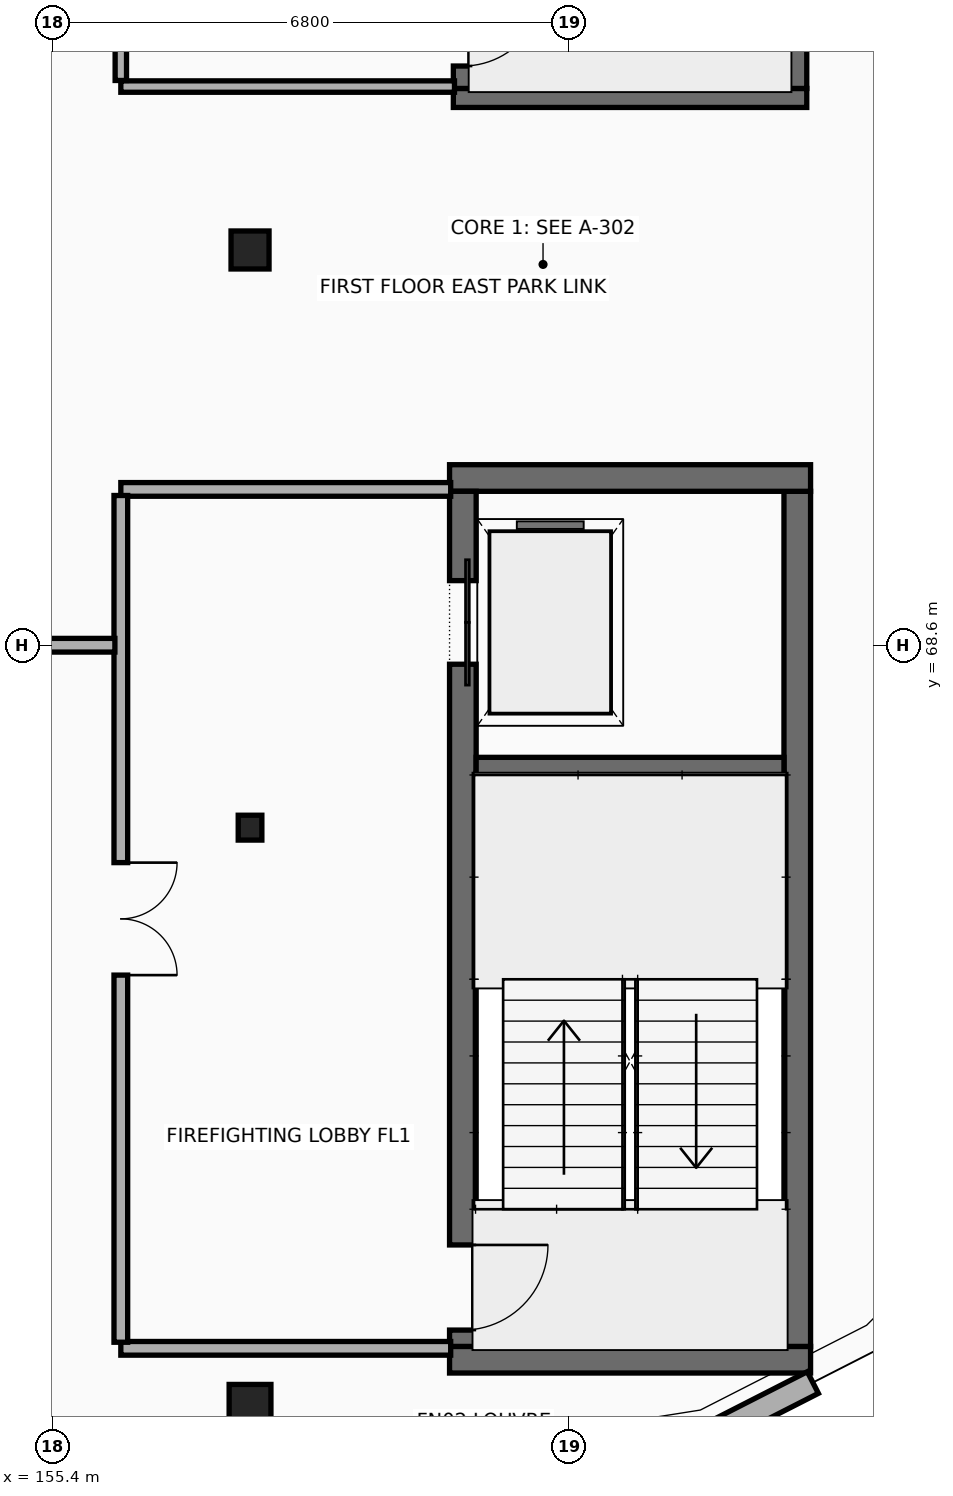
"""IFC4 building model, lengths in metres.
Left out: names, types, materials, properties, quantities, classifications, styles, units other than length and angle.
Written with IfcOpenShell. Run it as: python <this file> out.ifc"""

import sys

from ifc_helpers import new_model, si_unit, direction, frame, frame_2d, origin, origin_2d, place, context, subcontext, project, spatial, rectangle, i_section, extrude, element, fill, save


model = new_model("IFC4")
c1 = context("Model", 3, precision=1e-05, world=origin(), true_north=direction((0.0, 1.0)))
c2 = subcontext(c1, "Body", "Model", "MODEL_VIEW")
j1 = project(units=[si_unit("LENGTHUNIT", "METRE"), si_unit("PLANEANGLEUNIT", "RADIAN")], contexts=[c1])
p1 = place(None, origin())
s1 = spatial("IfcSite", under=j1, at=p1, CompositionType="ELEMENT")
p2 = place(p1, origin())
s2 = spatial("IfcBuilding", under=s1, at=p2, CompositionType="ELEMENT")
p3 = place(p2, frame((0.0, 0.0, 4.8)))
s3 = spatial("IfcBuildingStorey", under=s2, at=p3, CompositionType="ELEMENT", Elevation=4.8)
p4 = place(p3, frame((160.625, 59.2, 0.0), z_axis=(0.0, 0.0, 1.0), x_axis=(1.0, 0.0, 0.0)))
e1 = element("IfcWall", 1, at=p4, inside=s3, PredefinedType="SHEAR", context=c2, shape_type="SweptSolid", body=[
    extrude(rectangle(XDim=4.75, YDim=0.35, at=frame_2d((2.375, 0.0))), origin(), (0.0, 0.0, 1.0), 3.9),
])
p5 = place(p3, frame((165.2, 59.375, 0.0), z_axis=(0.0, 0.0, 1.0), x_axis=(0.0, 1.0, 0.0)))
e2 = element("IfcWall", 2, at=p5, inside=s3, PredefinedType="SHEAR", context=c2, shape_type="SweptSolid", body=[
    extrude(rectangle(XDim=11.25, YDim=0.35, at=frame_2d((5.625, 0.0))), origin(), (0.0, 0.0, 1.0), 3.9),
])
p6 = place(p3, frame((165.375, 70.8, 0.0), z_axis=(0.0, 0.0, 1.0), x_axis=(-1.0, 0.0, 0.0)))
e3 = element("IfcWall", 3, at=p6, inside=s3, PredefinedType="SHEAR", context=c2, shape_type="SweptSolid", body=[
    extrude(rectangle(XDim=4.75, YDim=0.35, at=frame_2d((2.375, 0.0))), origin(), (0.0, 0.0, 1.0), 3.9),
])
p7 = place(p3, frame((160.8, 70.625, 0.0), z_axis=(0.0, 0.0, 1.0), x_axis=(0.0, -1.0, 0.0)))
e4 = element("IfcWall", 4, at=p7, inside=s3, PredefinedType="SHEAR", context=c2, shape_type="SweptSolid", body=[
    extrude(rectangle(XDim=11.25, YDim=0.35, at=frame_2d((5.625, 0.0))), origin(), (0.0, 0.0, 1.0), 3.9),
])
p8 = place(p7, frame((1.175, 0.0, 0.0)))
e5 = element("IfcOpeningElement", 5, at=p8, cuts=e4, PredefinedType="OPENING", context=c2, shape_type="SweptSolid", body=[
    extrude(rectangle(XDim=1.1, YDim=2.2, at=frame_2d((0.55, 1.1))), frame((0.0, 0.185, 0.0), z_axis=(0.0, -1.0, 0.0), x_axis=(1.0, 0.0, 0.0)), (0.0, 0.0, 1.0), 0.37),
])
p9 = place(p7, frame((9.915, 0.0, 0.0)))
e6 = element("IfcOpeningElement", 6, at=p9, cuts=e4, PredefinedType="OPENING", context=c2, shape_type="SweptSolid", body=[
    extrude(rectangle(XDim=1.12, YDim=2.16, at=frame_2d((0.56, 1.08))), frame((0.0, 0.185, 0.0), z_axis=(0.0, -1.0, 0.0), x_axis=(1.0, 0.0, 0.0)), (0.0, 0.0, 1.0), 0.37),
])
p10 = place(p3, frame((160.975, 67.0, 0.0), z_axis=(0.0, 0.0, 1.0), x_axis=(1.0, 0.0, 0.0)))
e7 = element("IfcWall", 7, at=p10, inside=s3, PredefinedType="SHEAR", context=c2, shape_type="SweptSolid", body=[
    extrude(rectangle(XDim=4.05, YDim=0.25, at=frame_2d((2.025, 0.0))), origin(), (0.0, 0.0, 1.0), 3.9),
])
p11 = place(p3, frame((160.675, 75.8, 0.0), z_axis=(0.0, 0.0, 1.0), x_axis=(1.0, 0.0, 0.0)))
e8 = element("IfcWall", 8, at=p11, inside=s3, PredefinedType="SHEAR", context=c2, shape_type="SweptSolid", body=[
    extrude(rectangle(XDim=4.65, YDim=0.25, at=frame_2d((2.325, 0.0))), origin(), (0.0, 0.0, 1.0), 3.9),
])
p12 = place(p3, frame((165.2, 75.925, 0.0), z_axis=(0.0, 0.0, 1.0), x_axis=(0.0, 1.0, 0.0)))
e9 = element("IfcWall", 9, at=p12, inside=s3, PredefinedType="SHEAR", context=c2, shape_type="SweptSolid", body=[
    extrude(rectangle(XDim=11.35, YDim=0.25, at=frame_2d((5.675, 0.0))), origin(), (0.0, 0.0, 1.0), 3.9),
])
p13 = place(p3, frame((160.8, 87.275, 0.0), z_axis=(0.0, 0.0, 1.0), x_axis=(0.0, -1.0, 0.0)))
e10 = element("IfcWall", 10, at=p13, inside=s3, PredefinedType="SHEAR", context=c2, shape_type="SweptSolid", body=[
    extrude(rectangle(XDim=11.35, YDim=0.25, at=frame_2d((5.675, 0.0))), origin(), (0.0, 0.0, 1.0), 3.9),
])
p14 = place(p13, frame((1.275, 0.0, 0.0)))
e11 = element("IfcOpeningElement", 11, at=p14, cuts=e10, PredefinedType="OPENING", context=c2, shape_type="SweptSolid", body=[
    extrude(rectangle(XDim=1.0, YDim=2.15, at=frame_2d((0.5, 1.075))), frame((0.0, 0.135, 0.0), z_axis=(0.0, -1.0, 0.0), x_axis=(1.0, 0.0, 0.0)), (0.0, 0.0, 1.0), 0.27),
])
p15 = place(p13, frame((9.995, 0.0, 0.0)))
e12 = element("IfcOpeningElement", 12, at=p15, cuts=e10, PredefinedType="OPENING", context=c2, shape_type="SweptSolid", body=[
    extrude(rectangle(XDim=1.06, YDim=2.15, at=frame_2d((0.53, 1.075))), frame((0.0, 0.135, 0.0), z_axis=(0.0, -1.0, 0.0), x_axis=(1.0, 0.0, 0.0)), (0.0, 0.0, 1.0), 0.27),
])
p16 = place(p3, frame((158.0, 58.6, 0.0), z_axis=(0.0, 0.0, 1.0), x_axis=(1.0, 0.0, 0.0)))
e13 = element("IfcColumn", 13, at=p16, inside=s3, PredefinedType="COLUMN", context=c2, shape_type="SweptSolid", body=[
    extrude(rectangle(XDim=0.55, YDim=0.55, at=origin_2d()), origin(), (0.0, 0.0, 1.0), 3.9),
])
p17 = place(p3, frame((158.0, 66.2, 0.0), z_axis=(0.0, 0.0, 1.0), x_axis=(1.0, 0.0, 0.0)))
e14 = element("IfcColumn", 14, at=p17, inside=s3, PredefinedType="COLUMN", context=c2, shape_type="SweptSolid", body=[
    extrude(i_section(OverallWidth=0.311, OverallDepth=0.327, WebThickness=0.016, FlangeThickness=0.025, at=origin_2d()), origin(), (0.0, 0.0, 1.0), 3.9),
])
p18 = place(p3, frame((158.0, 73.8, 0.0), z_axis=(0.0, 0.0, 1.0), x_axis=(1.0, 0.0, 0.0)))
e15 = element("IfcColumn", 15, at=p18, inside=s3, PredefinedType="COLUMN", context=c2, shape_type="SweptSolid", body=[
    extrude(rectangle(XDim=0.5, YDim=0.5, at=origin_2d()), origin(), (0.0, 0.0, 1.0), 3.9),
])
p19 = place(p3, frame((165.405, 58.9, 0.0), z_axis=(0.0, 0.0, 1.0), x_axis=(-0.890819654262, -0.454357066171, 0.0)))
e16 = element("IfcWall", 16, at=p19, inside=s3, PredefinedType="STANDARD", context=c2, shape_type="SweptSolid", body=[
    extrude(rectangle(XDim=1.501, YDim=0.32, at=frame_2d((0.75, 0.0))), origin(), (0.0, 0.0, 1.0), 3.612),
])
p20 = place(p3, frame((156.3, 59.35, 0.0), z_axis=(0.0, 0.0, 1.0), x_axis=(1.0, 0.0, 0.0)))
e17 = element("IfcWall", 17, at=p20, inside=s3, PredefinedType="PARTITIONING", context=c2, shape_type="SweptSolid", body=[
    extrude(rectangle(XDim=4.34, YDim=0.18, at=frame_2d((2.17, 0.0))), origin(), (0.0, 0.0, 1.0), 3.061),
])
p21 = place(p3, frame((160.64, 70.65, 0.0), z_axis=(0.0, 0.0, 1.0), x_axis=(-1.0, 0.0, 0.0)))
e18 = element("IfcWall", 18, at=p21, inside=s3, PredefinedType="PARTITIONING", context=c2, shape_type="SweptSolid", body=[
    extrude(rectangle(XDim=4.34, YDim=0.18, at=frame_2d((2.17, 0.0))), origin(), (0.0, 0.0, 1.0), 2.992),
])
p22 = place(p3, frame((156.3, 70.57, 0.0), z_axis=(0.0, 0.0, 1.0), x_axis=(0.0, -1.0, 0.0)))
e19 = element("IfcWall", 19, at=p22, inside=s3, PredefinedType="PARTITIONING", context=c2, shape_type="SweptSolid", body=[
    extrude(rectangle(XDim=11.14, YDim=0.18, at=frame_2d((5.57, 0.0))), origin(), (0.0, 0.0, 1.0), 3.15),
])
p23 = place(p22, frame((4.83, 0.0, 0.0)))
e20 = element("IfcOpeningElement", 20, at=p23, cuts=e19, PredefinedType="OPENING", context=c2, shape_type="SweptSolid", body=[
    extrude(rectangle(XDim=1.48, YDim=2.22, at=frame_2d((0.74, 1.11))), frame((0.0, 0.1, 0.0), z_axis=(0.0, -1.0, 0.0), x_axis=(1.0, 0.0, 0.0)), (0.0, 0.0, 1.0), 0.2),
])
p24 = place(p3, frame((156.3, 75.95, 0.0), z_axis=(0.0, 0.0, 1.0), x_axis=(1.0, 0.0, 0.0)))
e21 = element("IfcWall", 21, at=p24, inside=s3, PredefinedType="PARTITIONING", context=c2, shape_type="SweptSolid", body=[
    extrude(rectangle(XDim=4.39, YDim=0.15, at=frame_2d((2.195, 0.0))), origin(), (0.0, 0.0, 1.0), 2.988),
])
p25 = place(p3, frame((156.3, 87.17, 0.0), z_axis=(0.0, 0.0, 1.0), x_axis=(0.0, -1.0, 0.0)))
e22 = element("IfcWall", 22, at=p25, inside=s3, PredefinedType="PARTITIONING", context=c2, shape_type="SweptSolid", body=[
    extrude(rectangle(XDim=11.14, YDim=0.15, at=frame_2d((5.57, 0.0))), origin(), (0.0, 0.0, 1.0), 2.992),
])
p26 = place(p25, frame((4.88, 0.0, 0.0)))
e23 = element("IfcOpeningElement", 23, at=p26, cuts=e22, PredefinedType="OPENING", context=c2, shape_type="SweptSolid", body=[
    extrude(rectangle(XDim=1.38, YDim=2.2, at=frame_2d((0.69, 1.1))), frame((0.0, 0.085, 0.0), z_axis=(0.0, -1.0, 0.0), x_axis=(1.0, 0.0, 0.0)), (0.0, 0.0, 1.0), 0.17),
])
p27 = place(p3, frame((133.477, 68.6, 0.0), z_axis=(0.0, 0.0, 1.0), x_axis=(1.0, 0.0, 0.0)))
e24 = element("IfcWall", 24, at=p27, inside=s3, PredefinedType="PARTITIONING", context=c2, shape_type="SweptSolid", body=[
    extrude(rectangle(XDim=22.745, YDim=0.18, at=frame_2d((11.373, 0.0))), origin(), (0.0, 0.0, 1.0), 2.863),
])
p28 = place(p8, origin())
e25 = element("IfcDoor", 25, at=p28, inside=s3, OperationType="DOUBLE_DOOR_SLIDING", PredefinedType="DOOR", context=c2, shape_type="SweptSolid", body=[
    extrude(rectangle(XDim=1.1, YDim=2.2, at=frame_2d((0.55, 1.1))), frame((0.0, 0.025, 0.0), z_axis=(0.0, -1.0, 0.0), x_axis=(1.0, 0.0, 0.0)), (0.0, 0.0, 1.0), 0.05),
])
fill(e5, e25)
p29 = place(p9, origin())
e26 = element("IfcDoor", 26, at=p29, inside=s3, OperationType="SINGLE_SWING_LEFT", PredefinedType="DOOR", context=c2, shape_type="SweptSolid", body=[
    extrude(rectangle(XDim=1.12, YDim=2.16, at=frame_2d((0.56, 1.08))), frame((0.0, 0.025, 0.0), z_axis=(0.0, -1.0, 0.0), x_axis=(1.0, 0.0, 0.0)), (0.0, 0.0, 1.0), 0.05),
])
fill(e6, e26)
p30 = place(p15, origin())
e27 = element("IfcDoor", 27, at=p30, inside=s3, OperationType="SINGLE_SWING_LEFT", PredefinedType="DOOR", context=c2, shape_type="SweptSolid", body=[
    extrude(rectangle(XDim=1.06, YDim=2.15, at=frame_2d((0.53, 1.075))), frame((0.0, 0.025, 0.0), z_axis=(0.0, -1.0, 0.0), x_axis=(1.0, 0.0, 0.0)), (0.0, 0.0, 1.0), 0.05),
])
fill(e12, e27)
p31 = place(p23, origin())
e28 = element("IfcDoor", 28, at=p31, inside=s3, OperationType="DOUBLE_DOOR_SINGLE_SWING", PredefinedType="DOOR", context=c2, shape_type="SweptSolid", body=[
    extrude(rectangle(XDim=1.48, YDim=2.22, at=frame_2d((0.74, 1.11))), frame((0.0, 0.025, 0.0), z_axis=(0.0, -1.0, 0.0), x_axis=(1.0, 0.0, 0.0)), (0.0, 0.0, 1.0), 0.05),
])
fill(e20, e28)
save(model, sys.argv[1])
